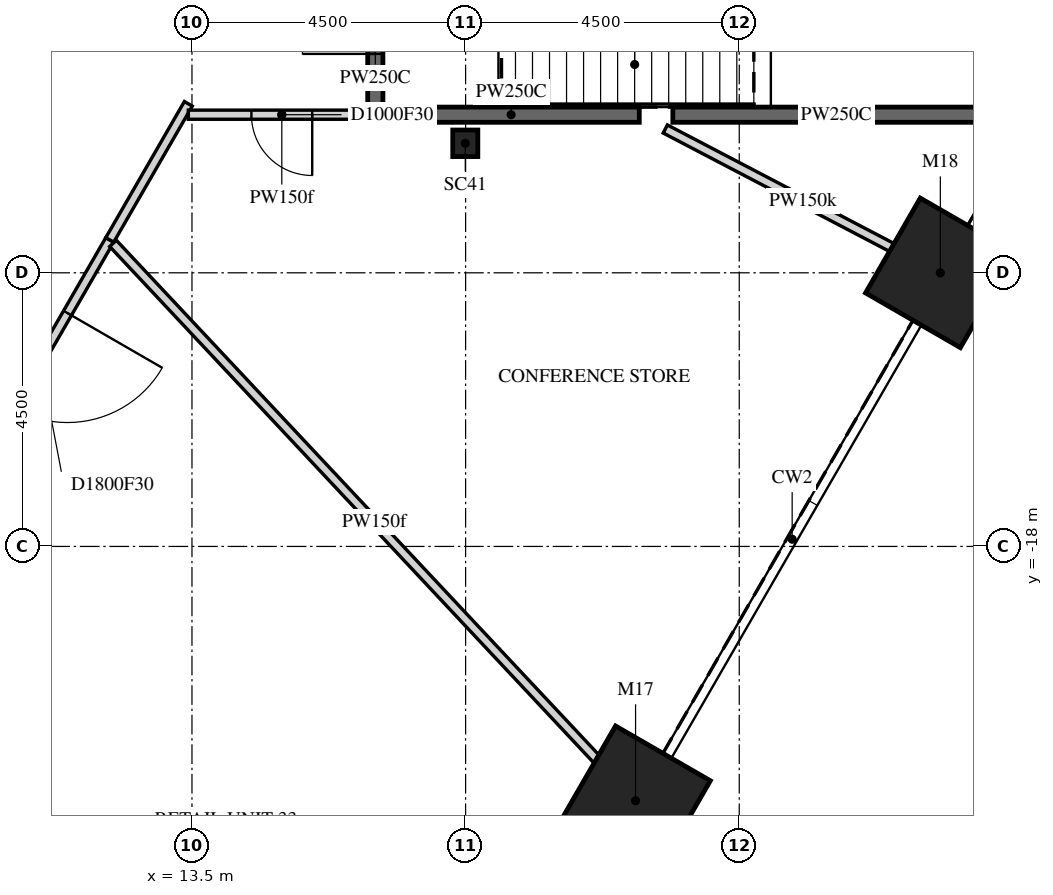
"""IFC4 building model, lengths in metres.
Left out: names, types, materials, properties, quantities, classifications, styles, units other than length and angle.
Written with IfcOpenShell. Run it as: python <this file> out.ifc"""

import sys

from ifc_helpers import new_model, si_unit, direction, frame, frame_2d, origin, origin_2d, place, context, subcontext, project, spatial, polyline, rectangle, i_section, outline, extrude, element, fill, save


model = new_model("IFC4")
c1 = context("Model", 3, precision=1e-05, world=origin(), true_north=direction((0.0, 1.0)))
c2 = subcontext(c1, "Body", "Model", "MODEL_VIEW")
j1 = project(units=[si_unit("LENGTHUNIT", "METRE"), si_unit("PLANEANGLEUNIT", "RADIAN")], contexts=[c1])
p1 = place(None, origin())
s1 = spatial("IfcSite", under=j1, at=p1, CompositionType="ELEMENT")
p2 = place(p1, origin())
s2 = spatial("IfcBuilding", under=s1, at=p2, CompositionType="ELEMENT")
p3 = place(p2, frame((0.0, 0.0, 20.5)))
s3 = spatial("IfcBuildingStorey", under=s2, at=p3, CompositionType="ELEMENT", Elevation=20.5)
for number, where, z_axis, x_axis in (
    (1, (20.795, -22.182, -0.25), (0.0, 0.0, 1.0), (-0.5, -0.866, 0.0)),
    (2, (25.807, -13.501, -0.25), (0.0, 0.0, 1.0), (-0.5, -0.866, 0.0)),
):
    element("IfcColumn", number, at=place(p3, frame(where, z_axis=z_axis, x_axis=x_axis)), inside=s3, PredefinedType="COLUMN", context=c2, shape_type="SweptSolid", body=[
        extrude(rectangle(XDim=1.8, YDim=1.8, at=origin_2d()), origin(), (0.0, 0.0, 1.0), 5.5),
    ])
p4 = place(p3, frame((17.995, -11.37, -0.25), z_axis=(0.0, 0.0, 1.0), x_axis=(1.0, 0.0, 0.0)))
e3 = element("IfcColumn", 3, at=p4, inside=s3, PredefinedType="COLUMN", context=c2, shape_type="SweptSolid", body=[
    extrude(i_section(OverallWidth=0.412, OverallDepth=0.437, WebThickness=0.036, FlangeThickness=0.058, FilletRadius=0.015, at=origin_2d()), origin(), (0.0, 0.0, 1.0), 5.5),
])
p5 = place(p3, frame((7.91, -13.7, -0.25), z_axis=(0.0, 0.0, 1.0), x_axis=(0.499999880136, 0.866025472988, 0.0)))
e4 = element("IfcWall", 4, at=p5, inside=s3, PredefinedType="SHEAR", context=c2, shape_type="SweptSolid", body=[
    extrude(outline(polyline([(-0.173, -0.3), (15.993, -0.3), (15.646, 0.3), (0.173, 0.3), (-0.173, -0.3)])), origin(), (0.0, 0.0, 1.0), 5.5),
])
p6 = place(p5, frame((7.039, 0.0, 0.25)))
e5 = element("IfcOpeningElement", 5, at=p6, cuts=e4, PredefinedType="OPENING", context=c2, shape_type="SweptSolid", body=[
    extrude(rectangle(XDim=1.8, YDim=2.4, at=frame_2d((0.9, 1.2))), frame((0.0, 0.31, 0.0), z_axis=(0.0, -1.0, 0.0), x_axis=(1.0, 0.0, 0.0)), (0.0, 0.0, 1.0), 0.62),
])
p7 = place(p3, frame((5.673, -9.825, -0.25), z_axis=(0.0, 0.0, 1.0), x_axis=(0.499995046907, 0.866028263435, 0.0)))
e6 = element("IfcWall", 6, at=p7, inside=s3, PredefinedType="SHEAR", context=c2, shape_type="SweptSolid", body=[
    extrude(outline(polyline([(-0.101, -0.175), (11.446, -0.175), (11.244, 0.175), (0.101, 0.175), (-0.101, -0.175)])), origin(), (0.0, 0.0, 1.0), 5.5),
])
p8 = place(p7, frame((4.801, 0.0, 0.25)))
e7 = element("IfcOpeningElement", 7, at=p8, cuts=e6, PredefinedType="OPENING", context=c2, shape_type="SweptSolid", body=[
    extrude(rectangle(XDim=1.8, YDim=2.4, at=frame_2d((0.9, 1.2))), frame((0.0, 0.185, 0.0), z_axis=(0.0, -1.0, 0.0), x_axis=(1.0, 0.0, 0.0)), (0.0, 0.0, 1.0), 0.37),
])
p9 = place(p3, frame((12.148, -12.959, 0.0), z_axis=(0.0, 0.0, 1.0), x_axis=(-0.499957811549, -0.866049759928, 0.0)))
e8 = element("IfcWall", 8, at=p9, inside=s3, PredefinedType="PARTITIONING", context=c2, shape_type="SweptSolid", body=[
    extrude(rectangle(XDim=4.58, YDim=0.15, at=frame_2d((2.29, 0.0))), origin(), (0.0, 0.0, 1.0), 5.25),
])
p10 = place(p9, frame((1.39, 0.0, 0.0)))
e9 = element("IfcOpeningElement", 9, at=p10, cuts=e8, PredefinedType="OPENING", context=c2, shape_type="SweptSolid", body=[
    extrude(rectangle(XDim=1.8, YDim=2.1, at=frame_2d((0.9, 1.05))), frame((0.0, 0.085, 0.0), z_axis=(0.0, -1.0, 0.0), x_axis=(1.0, 0.0, 0.0)), (0.0, 0.0, 1.0), 0.17),
])
p11 = place(p3, frame((12.148, -12.959, 0.0), z_axis=(0.0, 0.0, 1.0), x_axis=(0.499959617396, 0.866048717436, 0.0)))
e10 = element("IfcWall", 10, at=p11, inside=s3, PredefinedType="PARTITIONING", context=c2, shape_type="SweptSolid", body=[
    extrude(rectangle(XDim=2.584, YDim=0.15, at=frame_2d((1.292, 0.0))), origin(), (0.0, 0.0, 1.0), 5.25),
])
p12 = place(p3, frame((16.515, -10.9, 0.0), z_axis=(0.0, 0.0, 1.0), x_axis=(-1.0, 0.0, 0.0)))
e11 = element("IfcWall", 11, at=p12, inside=s3, PredefinedType="PARTITIONING", context=c2, shape_type="SweptSolid", body=[
    extrude(rectangle(XDim=3.075, YDim=0.15, at=frame_2d((1.538, 0.0))), origin(), (0.0, 0.0, 1.0), 4.496),
])
p13 = place(p12, frame((1.038, 0.0, 0.0)))
e12 = element("IfcOpeningElement", 12, at=p13, cuts=e11, PredefinedType="OPENING", context=c2, shape_type="SweptSolid", body=[
    extrude(rectangle(XDim=1.0, YDim=2.1, at=frame_2d((0.5, 1.05))), frame((0.0, 0.085, 0.0), z_axis=(0.0, -1.0, 0.0), x_axis=(1.0, 0.0, 0.0)), (0.0, 0.0, 1.0), 0.17),
])
p14 = place(p3, frame((16.515, -10.825, 0.0), z_axis=(0.0, 0.0, 1.0), x_axis=(0.0, 1.0, 0.0)))
e13 = element("IfcWall", 13, at=p14, inside=s3, PredefinedType="PARTITIONING", context=c2, shape_type="SweptSolid", body=[
    extrude(rectangle(XDim=3.05, YDim=0.25, at=frame_2d((1.525, 0.0))), origin(), (0.0, 0.0, 1.0), 5.25),
])
p15 = place(p14, frame((0.925, 0.0, 0.0)))
e14 = element("IfcOpeningElement", 14, at=p15, cuts=e13, PredefinedType="OPENING", context=c2, shape_type="SweptSolid", body=[
    extrude(rectangle(XDim=1.2, YDim=2.1, at=frame_2d((0.6, 1.05))), frame((0.0, 0.135, 0.0), z_axis=(0.0, -1.0, 0.0), x_axis=(1.0, 0.0, 0.0)), (0.0, 0.0, 1.0), 0.27),
])
p16 = place(p3, frame((20.795, -22.182, 0.0), z_axis=(0.0, 0.0, 1.0), x_axis=(-0.683955995382, 0.729523266511, 0.0)))
e15 = element("IfcWall", 15, at=p16, inside=s3, PredefinedType="PARTITIONING", context=c2, shape_type="SweptSolid", body=[
    extrude(rectangle(XDim=12.564, YDim=0.15, at=frame_2d((6.282, 0.0))), origin(), (0.0, 0.0, 1.0), 4.496),
])
p17 = place(p3, frame((20.856, -10.9, 0.0), z_axis=(0.0, 0.0, 1.0), x_axis=(-1.0, 0.0, 0.0)))
e16 = element("IfcWall", 16, at=p17, inside=s3, PredefinedType="PARTITIONING", context=c2, shape_type="SweptSolid", body=[
    extrude(rectangle(XDim=4.216, YDim=0.25, at=frame_2d((2.108, 0.0))), origin(), (0.0, 0.0, 1.0), 5.25),
])
p18 = place(p3, frame((25.807, -13.501, 0.0), z_axis=(0.0, 0.0, 1.0), x_axis=(-0.886088844059, 0.463515437104, 0.0)))
e17 = element("IfcWall", 17, at=p18, inside=s3, PredefinedType="PARTITIONING", context=c2, shape_type="SweptSolid", body=[
    extrude(rectangle(XDim=5.104, YDim=0.15, at=frame_2d((2.552, 0.0))), origin(), (0.0, 0.0, 1.0), 4.323),
])
p19 = place(p3, frame((26.785, -10.9, 0.0), z_axis=(0.0, 0.0, 1.0), x_axis=(-1.0, 0.0, 0.0)))
e18 = element("IfcWall", 18, at=p19, inside=s3, PredefinedType="PARTITIONING", context=c2, shape_type="SweptSolid", body=[
    extrude(rectangle(XDim=5.377, YDim=0.25, at=frame_2d((2.688, 0.0))), origin(), (0.0, 0.0, 1.0), 5.25),
])
p20 = place(p10, origin())
e19 = element("IfcDoor", 19, at=p20, inside=s3, OperationType="DOUBLE_DOOR_SINGLE_SWING", PredefinedType="DOOR", context=c2, shape_type="SweptSolid", body=[
    extrude(rectangle(XDim=1.8, YDim=2.1, at=frame_2d((0.9, 1.05))), frame((0.0, 0.025, 0.0), z_axis=(0.0, -1.0, 0.0), x_axis=(1.0, 0.0, 0.0)), (0.0, 0.0, 1.0), 0.05),
])
fill(e9, e19)
p21 = place(p13, origin())
e20 = element("IfcDoor", 20, at=p21, inside=s3, OperationType="SINGLE_SWING_LEFT", PredefinedType="DOOR", context=c2, shape_type="SweptSolid", body=[
    extrude(rectangle(XDim=1.0, YDim=2.1, at=frame_2d((0.5, 1.05))), frame((0.0, 0.025, 0.0), z_axis=(0.0, -1.0, 0.0), x_axis=(1.0, 0.0, 0.0)), (0.0, 0.0, 1.0), 0.05),
])
fill(e12, e20)
p22 = place(p15, origin())
e21 = element("IfcDoor", 21, at=p22, inside=s3, OperationType="SINGLE_SWING_RIGHT", PredefinedType="DOOR", context=c2, shape_type="SweptSolid", body=[
    extrude(rectangle(XDim=1.2, YDim=2.1, at=frame_2d((0.6, 1.05))), frame((0.0, 0.025, 0.0), z_axis=(0.0, -1.0, 0.0), x_axis=(1.0, 0.0, 0.0)), (0.0, 0.0, 1.0), 0.05),
])
fill(e14, e21)
save(model, sys.argv[1])
